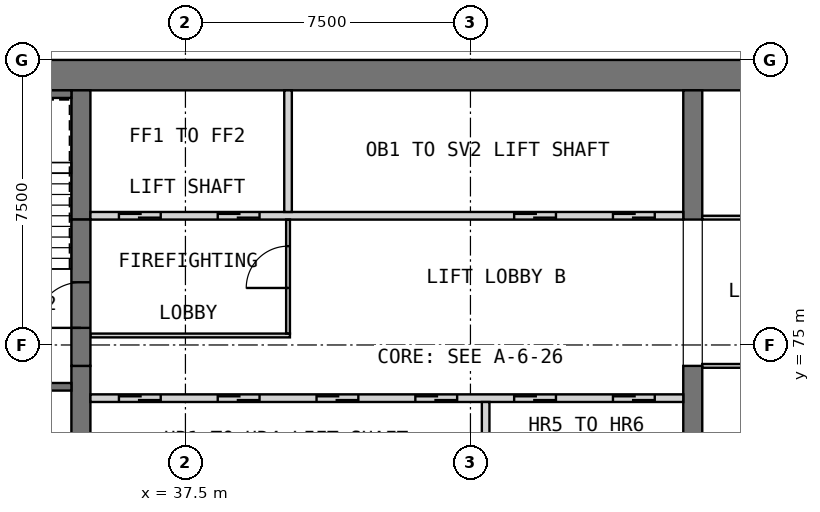
"""IFC4 building model, lengths in metres.
Left out: names, types, materials, properties, quantities, classifications, styles, units other than length and angle.
Written with IfcOpenShell. Run it as: python <this file> out.ifc"""

import sys

from ifc_helpers import new_model, si_unit, direction, frame, frame_2d, origin, place, context, subcontext, project, spatial, rectangle, extrude, element, fill, save


model = new_model("IFC4")
c1 = context("Model", 3, precision=1e-05, world=origin(), true_north=direction((0.0, 1.0)))
c2 = subcontext(c1, "Body", "Model", "MODEL_VIEW")
j1 = project(units=[si_unit("LENGTHUNIT", "METRE"), si_unit("PLANEANGLEUNIT", "RADIAN")], contexts=[c1])
p1 = place(None, origin())
s1 = spatial("IfcSite", under=j1, at=p1, CompositionType="ELEMENT")
p2 = place(p1, origin())
s2 = spatial("IfcBuilding", under=s1, at=p2, CompositionType="ELEMENT")
p3 = place(p2, frame((0.0, 0.0, 210.7)))
s3 = spatial("IfcBuildingStorey", under=s2, at=p3, CompositionType="ELEMENT", Elevation=210.7)
p4 = place(p3, frame((30.0, 82.1, 0.0), z_axis=(0.0, 0.0, 1.0), x_axis=(1.0, 0.0, 0.0)))
e1 = element("IfcWall", 1, at=p4, inside=s3, PredefinedType="SHEAR", context=c2, shape_type="SweptSolid", body=[
    extrude(rectangle(XDim=30.0, YDim=0.8, at=frame_2d((15.0, 0.0))), origin(), (0.0, 0.0, 1.0), 3.5),
])
p5 = place(p3, frame((34.75, 68.05, 0.0), z_axis=(0.0, 0.0, 1.0), x_axis=(0.0, 1.0, 0.0)))
e2 = element("IfcWall", 2, at=p5, inside=s3, PredefinedType="SHEAR", context=c2, shape_type="SweptSolid", body=[
    extrude(rectangle(XDim=6.4, YDim=0.5, at=frame_2d((3.2, 0.0))), origin(), (0.0, 0.0, 1.0), 3.5),
])
p6 = place(p3, frame((34.75, 78.3, 0.0), z_axis=(0.0, 0.0, 1.0), x_axis=(0.0, 1.0, 0.0)))
e3 = element("IfcWall", 3, at=p6, inside=s3, PredefinedType="SHEAR", context=c2, shape_type="SweptSolid", body=[
    extrude(rectangle(XDim=3.4, YDim=0.5, at=frame_2d((1.7, 0.0))), origin(), (0.0, 0.0, 1.0), 3.5),
])
p7 = place(p3, frame((50.85, 68.05, 0.0), z_axis=(0.0, 0.0, 1.0), x_axis=(0.0, 1.0, 0.0)))
e4 = element("IfcWall", 4, at=p7, inside=s3, PredefinedType="SHEAR", context=c2, shape_type="SweptSolid", body=[
    extrude(rectangle(XDim=6.4, YDim=0.5, at=frame_2d((3.2, 0.0))), origin(), (0.0, 0.0, 1.0), 3.5),
])
p8 = place(p3, frame((50.85, 78.3, 0.0), z_axis=(0.0, 0.0, 1.0), x_axis=(0.0, 1.0, 0.0)))
e5 = element("IfcWall", 5, at=p8, inside=s3, PredefinedType="SHEAR", context=c2, shape_type="SweptSolid", body=[
    extrude(rectangle(XDim=3.4, YDim=0.5, at=frame_2d((1.7, 0.0))), origin(), (0.0, 0.0, 1.0), 3.5),
])
p9 = place(p3, frame((35.0, 73.6, 0.0), z_axis=(0.0, 0.0, 1.0), x_axis=(1.0, 0.0, 0.0)))
e6 = element("IfcWall", 6, at=p9, inside=s3, PredefinedType="SOLIDWALL", context=c2, shape_type="SweptSolid", body=[
    extrude(rectangle(XDim=15.6, YDim=0.2, at=frame_2d((7.8, 0.0))), origin(), (0.0, 0.0, 1.0), 3.5),
])
p10 = place(p9, frame((0.75, 0.0, 0.0)))
e7 = element("IfcOpeningElement", 7, at=p10, cuts=e6, PredefinedType="OPENING", context=c2, shape_type="SweptSolid", body=[
    extrude(rectangle(XDim=1.1, YDim=2.1, at=frame_2d((0.55, 1.05))), frame((0.0, 0.11, 0.0), z_axis=(0.0, -1.0, 0.0), x_axis=(1.0, 0.0, 0.0)), (0.0, 0.0, 1.0), 0.22),
])
p11 = place(p9, frame((3.35, 0.0, 0.0)))
e8 = element("IfcOpeningElement", 8, at=p11, cuts=e6, PredefinedType="OPENING", context=c2, shape_type="SweptSolid", body=[
    extrude(rectangle(XDim=1.1, YDim=2.1, at=frame_2d((0.55, 1.05))), frame((0.0, 0.11, 0.0), z_axis=(0.0, -1.0, 0.0), x_axis=(1.0, 0.0, 0.0)), (0.0, 0.0, 1.0), 0.22),
])
p12 = place(p9, frame((5.95, 0.0, 0.0)))
e9 = element("IfcOpeningElement", 9, at=p12, cuts=e6, PredefinedType="OPENING", context=c2, shape_type="SweptSolid", body=[
    extrude(rectangle(XDim=1.1, YDim=2.1, at=frame_2d((0.55, 1.05))), frame((0.0, 0.11, 0.0), z_axis=(0.0, -1.0, 0.0), x_axis=(1.0, 0.0, 0.0)), (0.0, 0.0, 1.0), 0.22),
])
p13 = place(p9, frame((8.55, 0.0, 0.0)))
e10 = element("IfcOpeningElement", 10, at=p13, cuts=e6, PredefinedType="OPENING", context=c2, shape_type="SweptSolid", body=[
    extrude(rectangle(XDim=1.1, YDim=2.1, at=frame_2d((0.55, 1.05))), frame((0.0, 0.11, 0.0), z_axis=(0.0, -1.0, 0.0), x_axis=(1.0, 0.0, 0.0)), (0.0, 0.0, 1.0), 0.22),
])
p14 = place(p9, frame((11.15, 0.0, 0.0)))
e11 = element("IfcOpeningElement", 11, at=p14, cuts=e6, PredefinedType="OPENING", context=c2, shape_type="SweptSolid", body=[
    extrude(rectangle(XDim=1.1, YDim=2.1, at=frame_2d((0.55, 1.05))), frame((0.0, 0.11, 0.0), z_axis=(0.0, -1.0, 0.0), x_axis=(1.0, 0.0, 0.0)), (0.0, 0.0, 1.0), 0.22),
])
p15 = place(p9, frame((13.75, 0.0, 0.0)))
e12 = element("IfcOpeningElement", 12, at=p15, cuts=e6, PredefinedType="OPENING", context=c2, shape_type="SweptSolid", body=[
    extrude(rectangle(XDim=1.1, YDim=2.1, at=frame_2d((0.55, 1.05))), frame((0.0, 0.11, 0.0), z_axis=(0.0, -1.0, 0.0), x_axis=(1.0, 0.0, 0.0)), (0.0, 0.0, 1.0), 0.22),
])
p16 = place(p3, frame((45.4, 71.5, 0.0), z_axis=(0.0, 0.0, 1.0), x_axis=(0.0, 1.0, 0.0)))
e13 = element("IfcWall", 13, at=p16, inside=s3, PredefinedType="SOLIDWALL", context=c2, shape_type="SweptSolid", body=[
    extrude(rectangle(XDim=2.0, YDim=0.2, at=frame_2d((1.0, 0.0))), origin(), (0.0, 0.0, 1.0), 3.5),
])
p17 = place(p3, frame((35.0, 78.4, 0.0), z_axis=(0.0, 0.0, 1.0), x_axis=(1.0, 0.0, 0.0)))
e14 = element("IfcWall", 14, at=p17, inside=s3, PredefinedType="SOLIDWALL", context=c2, shape_type="SweptSolid", body=[
    extrude(rectangle(XDim=15.6, YDim=0.2, at=frame_2d((7.8, 0.0))), origin(), (0.0, 0.0, 1.0), 3.5),
])
p18 = place(p17, frame((0.75, 0.0, 0.0)))
e15 = element("IfcOpeningElement", 15, at=p18, cuts=e14, PredefinedType="OPENING", context=c2, shape_type="SweptSolid", body=[
    extrude(rectangle(XDim=1.1, YDim=2.1, at=frame_2d((0.55, 1.05))), frame((0.0, 0.11, 0.0), z_axis=(0.0, -1.0, 0.0), x_axis=(1.0, 0.0, 0.0)), (0.0, 0.0, 1.0), 0.22),
])
p19 = place(p17, frame((3.35, 0.0, 0.0)))
e16 = element("IfcOpeningElement", 16, at=p19, cuts=e14, PredefinedType="OPENING", context=c2, shape_type="SweptSolid", body=[
    extrude(rectangle(XDim=1.1, YDim=2.1, at=frame_2d((0.55, 1.05))), frame((0.0, 0.11, 0.0), z_axis=(0.0, -1.0, 0.0), x_axis=(1.0, 0.0, 0.0)), (0.0, 0.0, 1.0), 0.22),
])
p20 = place(p17, frame((11.15, 0.0, 0.0)))
e17 = element("IfcOpeningElement", 17, at=p20, cuts=e14, PredefinedType="OPENING", context=c2, shape_type="SweptSolid", body=[
    extrude(rectangle(XDim=1.1, YDim=2.1, at=frame_2d((0.55, 1.05))), frame((0.0, 0.11, 0.0), z_axis=(0.0, -1.0, 0.0), x_axis=(1.0, 0.0, 0.0)), (0.0, 0.0, 1.0), 0.22),
])
p21 = place(p17, frame((13.75, 0.0, 0.0)))
e18 = element("IfcOpeningElement", 18, at=p21, cuts=e14, PredefinedType="OPENING", context=c2, shape_type="SweptSolid", body=[
    extrude(rectangle(XDim=1.1, YDim=2.1, at=frame_2d((0.55, 1.05))), frame((0.0, 0.11, 0.0), z_axis=(0.0, -1.0, 0.0), x_axis=(1.0, 0.0, 0.0)), (0.0, 0.0, 1.0), 0.22),
])
p22 = place(p3, frame((40.2, 78.5, 0.0), z_axis=(0.0, 0.0, 1.0), x_axis=(0.0, 1.0, 0.0)))
e19 = element("IfcWall", 19, at=p22, inside=s3, PredefinedType="SOLIDWALL", context=c2, shape_type="SweptSolid", body=[
    extrude(rectangle(XDim=3.2, YDim=0.2, at=frame_2d((1.6, 0.0))), origin(), (0.0, 0.0, 1.0), 3.5),
])
p23 = place(p3, frame((35.0, 75.25, 0.0), z_axis=(0.0, 0.0, 1.0), x_axis=(1.0, 0.0, 0.0)))
e20 = element("IfcWall", 20, at=p23, inside=s3, PredefinedType="PARTITIONING", context=c2, shape_type="SweptSolid", body=[
    extrude(rectangle(XDim=5.25, YDim=0.1, at=frame_2d((2.625, 0.0))), origin(), (0.0, 0.0, 1.0), 3.09),
])
p24 = place(p3, frame((40.2, 75.3, 0.0), z_axis=(0.0, 0.0, 1.0), x_axis=(0.0, 1.0, 0.0)))
e21 = element("IfcWall", 21, at=p24, inside=s3, PredefinedType="PARTITIONING", context=c2, shape_type="SweptSolid", body=[
    extrude(rectangle(XDim=3.0, YDim=0.1, at=frame_2d((1.5, 0.0))), origin(), (0.0, 0.0, 1.0), 3.09),
])
p25 = place(p24, frame((1.2, 0.0, 0.0)))
e22 = element("IfcOpeningElement", 22, at=p25, cuts=e21, PredefinedType="OPENING", context=c2, shape_type="SweptSolid", body=[
    extrude(rectangle(XDim=1.1, YDim=2.1, at=frame_2d((0.55, 1.05))), frame((0.0, 0.06, 0.0), z_axis=(0.0, -1.0, 0.0), x_axis=(1.0, 0.0, 0.0)), (0.0, 0.0, 1.0), 0.12),
])
p26 = place(p3, frame((34.75, 74.45, 0.0), z_axis=(0.0, 0.0, 1.0), x_axis=(0.0, 1.0, 0.0)))
e23 = element("IfcWall", 23, at=p26, inside=s3, PredefinedType="SOLIDWALL", context=c2, shape_type="SweptSolid", body=[
    extrude(rectangle(XDim=3.85, YDim=0.5, at=frame_2d((1.925, 0.0))), origin(), (0.0, 0.0, 1.0), 2.3),
])
p27 = place(p26, frame((1.0, 0.0, 0.0)))
e24 = element("IfcOpeningElement", 24, at=p27, cuts=e23, PredefinedType="OPENING", context=c2, shape_type="SweptSolid", body=[
    extrude(rectangle(XDim=1.2, YDim=2.1, at=frame_2d((0.6, 1.05))), frame((0.0, 0.26, 0.0), z_axis=(0.0, -1.0, 0.0), x_axis=(1.0, 0.0, 0.0)), (0.0, 0.0, 1.0), 0.52),
])
p28 = place(p3, frame((30.8, 73.9, 0.0), z_axis=(0.0, 0.0, 1.0), x_axis=(1.0, 0.0, 0.0)))
e25 = element("IfcWall", 25, at=p28, inside=s3, PredefinedType="SOLIDWALL", context=c2, shape_type="SweptSolid", body=[
    extrude(rectangle(XDim=3.7, YDim=0.2, at=frame_2d((1.85, 0.0))), origin(), (0.0, 0.0, 1.0), 3.09),
])
p29 = place(p28, frame((1.5, 0.0, 0.0)))
e26 = element("IfcOpeningElement", 26, at=p29, cuts=e25, PredefinedType="OPENING", context=c2, shape_type="SweptSolid", body=[
    extrude(rectangle(XDim=0.9, YDim=2.1, at=frame_2d((0.45, 1.05))), frame((0.0, 0.11, 0.0), z_axis=(0.0, -1.0, 0.0), x_axis=(1.0, 0.0, 0.0)), (0.0, 0.0, 1.0), 0.22),
])
p30 = place(p3, frame((31.0, 81.6, 0.0), z_axis=(0.0, 0.0, 1.0), x_axis=(1.0, 0.0, 0.0)))
e27 = element("IfcWall", 27, at=p30, inside=s3, PredefinedType="SOLIDWALL", context=c2, shape_type="SweptSolid", body=[
    extrude(rectangle(XDim=3.5, YDim=0.2, at=frame_2d((1.75, 0.0))), origin(), (0.0, 0.0, 1.0), 3.09),
])
p31 = place(p3, frame((51.1, 74.45, 0.0), z_axis=(0.0, 0.0, 1.0), x_axis=(1.0, 0.0, 0.0)))
e28 = element("IfcWall", 28, at=p31, inside=s3, PredefinedType="PARTITIONING", context=c2, shape_type="SweptSolid", body=[
    extrude(rectangle(XDim=8.1, YDim=0.1, at=frame_2d((4.05, 0.0))), origin(), (0.0, 0.0, 1.0), 3.09),
])
p32 = place(p31, frame((3.6, 0.0, 0.0)))
e29 = element("IfcOpeningElement", 29, at=p32, cuts=e28, PredefinedType="OPENING", context=c2, shape_type="SweptSolid", body=[
    extrude(rectangle(XDim=0.9, YDim=2.1, at=frame_2d((0.45, 1.05))), frame((0.0, 0.06, 0.0), z_axis=(0.0, -1.0, 0.0), x_axis=(1.0, 0.0, 0.0)), (0.0, 0.0, 1.0), 0.12),
])
p33 = place(p3, frame((51.1, 78.35, 0.0), z_axis=(0.0, 0.0, 1.0), x_axis=(1.0, 0.0, 0.0)))
e30 = element("IfcWall", 30, at=p33, inside=s3, PredefinedType="PARTITIONING", context=c2, shape_type="SweptSolid", body=[
    extrude(rectangle(XDim=8.1, YDim=0.1, at=frame_2d((4.05, 0.0))), origin(), (0.0, 0.0, 1.0), 3.09),
])
p34 = place(p33, frame((3.6, 0.0, 0.0)))
e31 = element("IfcOpeningElement", 31, at=p34, cuts=e30, PredefinedType="OPENING", context=c2, shape_type="SweptSolid", body=[
    extrude(rectangle(XDim=0.9, YDim=2.1, at=frame_2d((0.45, 1.05))), frame((0.0, 0.06, 0.0), z_axis=(0.0, -1.0, 0.0), x_axis=(1.0, 0.0, 0.0)), (0.0, 0.0, 1.0), 0.12),
])
p35 = place(p10, origin())
e32 = element("IfcDoor", 32, at=p35, inside=s3, OperationType="DOUBLE_DOOR_SLIDING", PredefinedType="DOOR", context=c2, shape_type="SweptSolid", body=[
    extrude(rectangle(XDim=1.1, YDim=2.1, at=frame_2d((0.55, 1.05))), frame((0.0, 0.025, 0.0), z_axis=(0.0, -1.0, 0.0), x_axis=(1.0, 0.0, 0.0)), (0.0, 0.0, 1.0), 0.05),
])
fill(e7, e32)
p36 = place(p11, origin())
e33 = element("IfcDoor", 33, at=p36, inside=s3, OperationType="DOUBLE_DOOR_SLIDING", PredefinedType="DOOR", context=c2, shape_type="SweptSolid", body=[
    extrude(rectangle(XDim=1.1, YDim=2.1, at=frame_2d((0.55, 1.05))), frame((0.0, 0.025, 0.0), z_axis=(0.0, -1.0, 0.0), x_axis=(1.0, 0.0, 0.0)), (0.0, 0.0, 1.0), 0.05),
])
fill(e8, e33)
p37 = place(p12, origin())
e34 = element("IfcDoor", 34, at=p37, inside=s3, OperationType="DOUBLE_DOOR_SLIDING", PredefinedType="DOOR", context=c2, shape_type="SweptSolid", body=[
    extrude(rectangle(XDim=1.1, YDim=2.1, at=frame_2d((0.55, 1.05))), frame((0.0, 0.025, 0.0), z_axis=(0.0, -1.0, 0.0), x_axis=(1.0, 0.0, 0.0)), (0.0, 0.0, 1.0), 0.05),
])
fill(e9, e34)
p38 = place(p13, origin())
e35 = element("IfcDoor", 35, at=p38, inside=s3, OperationType="DOUBLE_DOOR_SLIDING", PredefinedType="DOOR", context=c2, shape_type="SweptSolid", body=[
    extrude(rectangle(XDim=1.1, YDim=2.1, at=frame_2d((0.55, 1.05))), frame((0.0, 0.025, 0.0), z_axis=(0.0, -1.0, 0.0), x_axis=(1.0, 0.0, 0.0)), (0.0, 0.0, 1.0), 0.05),
])
fill(e10, e35)
p39 = place(p14, origin())
e36 = element("IfcDoor", 36, at=p39, inside=s3, OperationType="DOUBLE_DOOR_SLIDING", PredefinedType="DOOR", context=c2, shape_type="SweptSolid", body=[
    extrude(rectangle(XDim=1.1, YDim=2.1, at=frame_2d((0.55, 1.05))), frame((0.0, 0.025, 0.0), z_axis=(0.0, -1.0, 0.0), x_axis=(1.0, 0.0, 0.0)), (0.0, 0.0, 1.0), 0.05),
])
fill(e11, e36)
p40 = place(p15, origin())
e37 = element("IfcDoor", 37, at=p40, inside=s3, OperationType="DOUBLE_DOOR_SLIDING", PredefinedType="DOOR", context=c2, shape_type="SweptSolid", body=[
    extrude(rectangle(XDim=1.1, YDim=2.1, at=frame_2d((0.55, 1.05))), frame((0.0, 0.025, 0.0), z_axis=(0.0, -1.0, 0.0), x_axis=(1.0, 0.0, 0.0)), (0.0, 0.0, 1.0), 0.05),
])
fill(e12, e37)
p41 = place(p18, origin())
e38 = element("IfcDoor", 38, at=p41, inside=s3, OperationType="DOUBLE_DOOR_SLIDING", PredefinedType="DOOR", context=c2, shape_type="SweptSolid", body=[
    extrude(rectangle(XDim=1.1, YDim=2.1, at=frame_2d((0.55, 1.05))), frame((0.0, 0.025, 0.0), z_axis=(0.0, -1.0, 0.0), x_axis=(1.0, 0.0, 0.0)), (0.0, 0.0, 1.0), 0.05),
])
fill(e15, e38)
p42 = place(p19, origin())
e39 = element("IfcDoor", 39, at=p42, inside=s3, OperationType="DOUBLE_DOOR_SLIDING", PredefinedType="DOOR", context=c2, shape_type="SweptSolid", body=[
    extrude(rectangle(XDim=1.1, YDim=2.1, at=frame_2d((0.55, 1.05))), frame((0.0, 0.025, 0.0), z_axis=(0.0, -1.0, 0.0), x_axis=(1.0, 0.0, 0.0)), (0.0, 0.0, 1.0), 0.05),
])
fill(e16, e39)
p43 = place(p20, origin())
e40 = element("IfcDoor", 40, at=p43, inside=s3, OperationType="DOUBLE_DOOR_SLIDING", PredefinedType="DOOR", context=c2, shape_type="SweptSolid", body=[
    extrude(rectangle(XDim=1.1, YDim=2.1, at=frame_2d((0.55, 1.05))), frame((0.0, 0.025, 0.0), z_axis=(0.0, -1.0, 0.0), x_axis=(1.0, 0.0, 0.0)), (0.0, 0.0, 1.0), 0.05),
])
fill(e17, e40)
p44 = place(p21, origin())
e41 = element("IfcDoor", 41, at=p44, inside=s3, OperationType="DOUBLE_DOOR_SLIDING", PredefinedType="DOOR", context=c2, shape_type="SweptSolid", body=[
    extrude(rectangle(XDim=1.1, YDim=2.1, at=frame_2d((0.55, 1.05))), frame((0.0, 0.025, 0.0), z_axis=(0.0, -1.0, 0.0), x_axis=(1.0, 0.0, 0.0)), (0.0, 0.0, 1.0), 0.05),
])
fill(e18, e41)
p45 = place(p25, origin())
e42 = element("IfcDoor", 42, at=p45, inside=s3, OperationType="SINGLE_SWING_LEFT", PredefinedType="DOOR", context=c2, shape_type="SweptSolid", body=[
    extrude(rectangle(XDim=1.1, YDim=2.1, at=frame_2d((0.55, 1.05))), frame((0.0, 0.025, 0.0), z_axis=(0.0, -1.0, 0.0), x_axis=(1.0, 0.0, 0.0)), (0.0, 0.0, 1.0), 0.05),
])
fill(e22, e42)
p46 = place(p27, origin())
e43 = element("IfcDoor", 43, at=p46, inside=s3, OperationType="SINGLE_SWING_RIGHT", PredefinedType="DOOR", context=c2, shape_type="SweptSolid", body=[
    extrude(rectangle(XDim=1.2, YDim=2.1, at=frame_2d((0.6, 1.05))), frame((0.0, 0.025, 0.0), z_axis=(0.0, -1.0, 0.0), x_axis=(1.0, 0.0, 0.0)), (0.0, 0.0, 1.0), 0.05),
])
fill(e24, e43)
save(model, sys.argv[1])
